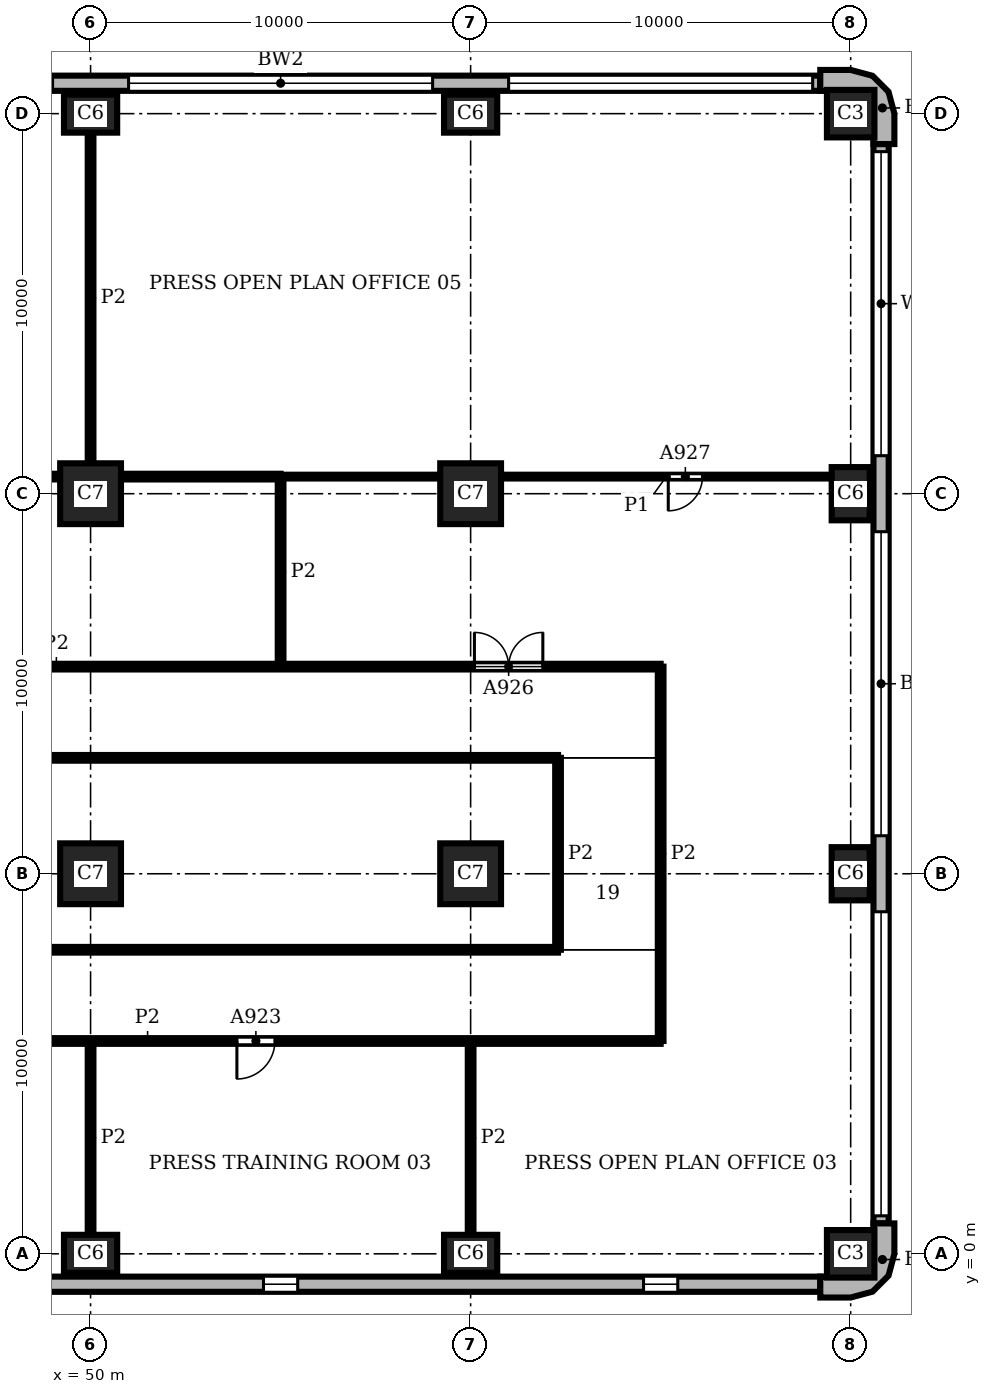
"""IFC4 building model, lengths in metres.
Left out: names, types, materials, properties, quantities, classifications, styles, units other than length and angle.
Written with IfcOpenShell. Run it as: python <this file> out.ifc"""

import sys

from ifc_helpers import new_model, si_unit, direction, frame, frame_2d, origin, origin_2d, place, context, subcontext, project, spatial, polyline, rectangle, outline, extrude, element, fill, save


model = new_model("IFC4")
c1 = context("Model", 3, precision=1e-05, world=origin(), true_north=direction((0.0, 1.0)))
c2 = subcontext(c1, "Body", "Model", "MODEL_VIEW")
j1 = project(units=[si_unit("LENGTHUNIT", "METRE"), si_unit("PLANEANGLEUNIT", "RADIAN")], contexts=[c1])
p1 = place(None, origin())
s1 = spatial("IfcSite", under=j1, at=p1, CompositionType="ELEMENT")
p2 = place(p1, origin())
s2 = spatial("IfcBuilding", under=s1, at=p2, CompositionType="ELEMENT")
p3 = place(p2, frame((0.0, 0.0, 113.4)))
s3 = spatial("IfcBuildingStorey", under=s2, at=p3, CompositionType="ELEMENT", Elevation=113.4)
for number, where, z_axis, x_axis in (
    (1, (50.0, 0.0, 0.0), (0.0, 0.0, 1.0), (1.0, 0.0, 0.0)),
    (2, (60.0, 0.0, 0.0), (0.0, 0.0, 1.0), (1.0, 0.0, 0.0)),
):
    element("IfcColumn", number, at=place(p3, frame(where, z_axis=z_axis, x_axis=x_axis)), inside=s3, PredefinedType="COLUMN", context=c2, shape_type="SweptSolid", body=[
        extrude(rectangle(XDim=1.4, YDim=1.0, at=origin_2d()), origin(), (0.0, 0.0, 1.0), 3.9),
    ])
p4 = place(p3, frame((70.0, 0.0, 0.0), z_axis=(0.0, 0.0, 1.0), x_axis=(1.0, 0.0, 0.0)))
e3 = element("IfcColumn", 3, at=p4, inside=s3, PredefinedType="COLUMN", context=c2, shape_type="SweptSolid", body=[
    extrude(rectangle(XDim=1.25, YDim=1.25, at=origin_2d()), origin(), (0.0, 0.0, 1.0), 3.9),
])
for number, where, z_axis, x_axis in (
    (4, (70.0, 10.0, 0.0), (0.0, 0.0, 1.0), (0.0, 1.0, 0.0)),
    (5, (70.0, 20.0, 0.0), (0.0, 0.0, 1.0), (0.0, 1.0, 0.0)),
):
    element("IfcColumn", number, at=place(p3, frame(where, z_axis=z_axis, x_axis=x_axis)), inside=s3, PredefinedType="COLUMN", context=c2, shape_type="SweptSolid", body=[
        extrude(rectangle(XDim=1.4, YDim=1.0, at=origin_2d()), origin(), (0.0, 0.0, 1.0), 3.9),
    ])
p5 = place(p3, frame((70.0, 30.0, 0.0), z_axis=(0.0, 0.0, 1.0), x_axis=(1.0, 0.0, 0.0)))
e6 = element("IfcColumn", 6, at=p5, inside=s3, PredefinedType="COLUMN", context=c2, shape_type="SweptSolid", body=[
    extrude(rectangle(XDim=1.25, YDim=1.25, at=origin_2d()), origin(), (0.0, 0.0, 1.0), 3.9),
])
for number, where, z_axis, x_axis in (
    (7, (60.0, 30.0, 0.0), (0.0, 0.0, 1.0), (1.0, 0.0, 0.0)),
    (8, (50.0, 30.0, 0.0), (0.0, 0.0, 1.0), (1.0, 0.0, 0.0)),
):
    element("IfcColumn", number, at=place(p3, frame(where, z_axis=z_axis, x_axis=x_axis)), inside=s3, PredefinedType="COLUMN", context=c2, shape_type="SweptSolid", body=[
        extrude(rectangle(XDim=1.4, YDim=1.0, at=origin_2d()), origin(), (0.0, 0.0, 1.0), 3.9),
    ])
for number, where, z_axis, x_axis in (
    (9, (50.0, 10.0, 0.0), (0.0, 0.0, 1.0), (1.0, 0.0, 0.0)),
    (10, (50.0, 20.0, 0.0), (0.0, 0.0, 1.0), (1.0, 0.0, 0.0)),
    (11, (60.0, 10.0, 0.0), (0.0, 0.0, 1.0), (1.0, 0.0, 0.0)),
    (12, (60.0, 20.0, 0.0), (0.0, 0.0, 1.0), (1.0, 0.0, 0.0)),
):
    element("IfcColumn", number, at=place(p3, frame(where, z_axis=z_axis, x_axis=x_axis)), inside=s3, PredefinedType="COLUMN", context=c2, shape_type="SweptSolid", body=[
        extrude(rectangle(XDim=1.6, YDim=1.6, at=origin_2d()), origin(), (0.0, 0.0, 1.0), 3.9),
    ])
p6 = place(p3, origin())
e13 = element("IfcWall", 13, at=p6, inside=s3, PredefinedType="SOLIDWALL", context=c2, shape_type="SweptSolid", body=[
    extrude(outline(polyline([(69.2, -1.0), (69.2, -1.15), (70.0, -1.15), (70.575, -0.996), (70.996, -0.575), (71.15, 0.0), (71.15, 0.8), (71.0, 0.8), (70.6, 0.8), (70.6, 0.0), (70.52, -0.3), (70.3, -0.52), (70.0, -0.6), (69.2, -0.6), (69.2, -1.0)])), origin(), (0.0, 0.0, 1.0), 3.9),
])
e14 = element("IfcWall", 14, at=p6, inside=s3, PredefinedType="SOLIDWALL", context=c2, shape_type="SweptSolid", body=[
    extrude(outline(polyline([(71.0, 29.2), (71.15, 29.2), (71.15, 30.0), (70.996, 30.575), (70.575, 30.996), (70.0, 31.15), (69.2, 31.15), (69.2, 31.0), (69.2, 30.6), (70.0, 30.6), (70.3, 30.52), (70.52, 30.3), (70.6, 30.0), (70.6, 29.2), (71.0, 29.2)])), origin(), (0.0, 0.0, 1.0), 3.9),
])
p7 = place(p3, frame((20.8, -0.8, 0.0), z_axis=(0.0, 0.0, 1.0), x_axis=(1.0, 0.0, 0.0)))
e15 = element("IfcWall", 15, at=p7, inside=s3, PredefinedType="SOLIDWALL", context=c2, shape_type="SweptSolid", body=[
    extrude(rectangle(XDim=48.4, YDim=0.4, at=frame_2d((24.2, 0.0))), origin(), (0.0, 0.0, 1.0), 3.9),
])
p8 = place(p7, frame((3.75, 0.0, 0.9)))
e16 = element("IfcOpeningElement", 16, at=p8, cuts=e15, PredefinedType="OPENING", context=c2, shape_type="SweptSolid", body=[
    extrude(rectangle(XDim=0.9, YDim=2.35, at=frame_2d((0.45, 1.175))), frame((0.0, 0.21, 0.0), z_axis=(0.0, -1.0, 0.0), x_axis=(1.0, 0.0, 0.0)), (0.0, 0.0, 1.0), 0.42),
])
p9 = place(p7, frame((13.75, 0.0, 0.9)))
e17 = element("IfcOpeningElement", 17, at=p9, cuts=e15, PredefinedType="OPENING", context=c2, shape_type="SweptSolid", body=[
    extrude(rectangle(XDim=0.9, YDim=2.35, at=frame_2d((0.45, 1.175))), frame((0.0, 0.21, 0.0), z_axis=(0.0, -1.0, 0.0), x_axis=(1.0, 0.0, 0.0)), (0.0, 0.0, 1.0), 0.42),
])
p10 = place(p7, frame((23.75, 0.0, 0.9)))
e18 = element("IfcOpeningElement", 18, at=p10, cuts=e15, PredefinedType="OPENING", context=c2, shape_type="SweptSolid", body=[
    extrude(rectangle(XDim=0.9, YDim=2.35, at=frame_2d((0.45, 1.175))), frame((0.0, 0.21, 0.0), z_axis=(0.0, -1.0, 0.0), x_axis=(1.0, 0.0, 0.0)), (0.0, 0.0, 1.0), 0.42),
])
p11 = place(p7, frame((33.75, 0.0, 0.9)))
e19 = element("IfcOpeningElement", 19, at=p11, cuts=e15, PredefinedType="OPENING", context=c2, shape_type="SweptSolid", body=[
    extrude(rectangle(XDim=0.9, YDim=2.35, at=frame_2d((0.45, 1.175))), frame((0.0, 0.21, 0.0), z_axis=(0.0, -1.0, 0.0), x_axis=(1.0, 0.0, 0.0)), (0.0, 0.0, 1.0), 0.42),
])
p12 = place(p7, frame((43.75, 0.0, 0.9)))
e20 = element("IfcOpeningElement", 20, at=p12, cuts=e15, PredefinedType="OPENING", context=c2, shape_type="SweptSolid", body=[
    extrude(rectangle(XDim=0.9, YDim=2.35, at=frame_2d((0.45, 1.175))), frame((0.0, 0.21, 0.0), z_axis=(0.0, -1.0, 0.0), x_axis=(1.0, 0.0, 0.0)), (0.0, 0.0, 1.0), 0.42),
])
p13 = place(p3, frame((70.8, 0.8, 0.0), z_axis=(0.0, 0.0, 1.0), x_axis=(0.0, 1.0, 0.0)))
e21 = element("IfcWall", 21, at=p13, inside=s3, PredefinedType="SOLIDWALL", context=c2, shape_type="SweptSolid", body=[
    extrude(rectangle(XDim=28.4, YDim=0.4, at=frame_2d((14.2, 0.0))), origin(), (0.0, 0.0, 1.0), 3.9),
])
p14 = place(p13, frame((0.2, 0.0, 0.9)))
e22 = element("IfcOpeningElement", 22, at=p14, cuts=e21, PredefinedType="OPENING", context=c2, shape_type="SweptSolid", body=[
    extrude(rectangle(XDim=8.0, YDim=2.35, at=frame_2d((4.0, 1.175))), frame((0.0, 0.21, 0.0), z_axis=(0.0, -1.0, 0.0), x_axis=(1.0, 0.0, 0.0)), (0.0, 0.0, 1.0), 0.42),
])
p15 = place(p13, frame((10.2, 0.0, 0.9)))
e23 = element("IfcOpeningElement", 23, at=p15, cuts=e21, PredefinedType="OPENING", context=c2, shape_type="SweptSolid", body=[
    extrude(rectangle(XDim=8.0, YDim=2.35, at=frame_2d((4.0, 1.175))), frame((0.0, 0.21, 0.0), z_axis=(0.0, -1.0, 0.0), x_axis=(1.0, 0.0, 0.0)), (0.0, 0.0, 1.0), 0.42),
])
p16 = place(p13, frame((20.2, 0.0, 0.9)))
e24 = element("IfcOpeningElement", 24, at=p16, cuts=e21, PredefinedType="OPENING", context=c2, shape_type="SweptSolid", body=[
    extrude(rectangle(XDim=8.0, YDim=2.35, at=frame_2d((4.0, 1.175))), frame((0.0, 0.21, 0.0), z_axis=(0.0, -1.0, 0.0), x_axis=(1.0, 0.0, 0.0)), (0.0, 0.0, 1.0), 0.42),
])
p17 = place(p3, frame((69.2, 30.8, 0.0), z_axis=(0.0, 0.0, 1.0), x_axis=(-1.0, 0.0, 0.0)))
e25 = element("IfcWall", 25, at=p17, inside=s3, PredefinedType="SOLIDWALL", context=c2, shape_type="SweptSolid", body=[
    extrude(rectangle(XDim=28.4, YDim=0.4, at=frame_2d((14.2, 0.0))), origin(), (0.0, 0.0, 1.0), 3.9),
])
p18 = place(p17, frame((0.2, 0.0, 0.9)))
e26 = element("IfcOpeningElement", 26, at=p18, cuts=e25, PredefinedType="OPENING", context=c2, shape_type="SweptSolid", body=[
    extrude(rectangle(XDim=8.0, YDim=2.35, at=frame_2d((4.0, 1.175))), frame((0.0, 0.21, 0.0), z_axis=(0.0, -1.0, 0.0), x_axis=(1.0, 0.0, 0.0)), (0.0, 0.0, 1.0), 0.42),
])
p19 = place(p17, frame((10.2, 0.0, 0.9)))
e27 = element("IfcOpeningElement", 27, at=p19, cuts=e25, PredefinedType="OPENING", context=c2, shape_type="SweptSolid", body=[
    extrude(rectangle(XDim=8.0, YDim=2.35, at=frame_2d((4.0, 1.175))), frame((0.0, 0.21, 0.0), z_axis=(0.0, -1.0, 0.0), x_axis=(1.0, 0.0, 0.0)), (0.0, 0.0, 1.0), 0.42),
])
p20 = place(p17, frame((20.2, 0.0, 0.9)))
e28 = element("IfcOpeningElement", 28, at=p20, cuts=e25, PredefinedType="OPENING", context=c2, shape_type="SweptSolid", body=[
    extrude(rectangle(XDim=8.0, YDim=2.35, at=frame_2d((4.0, 1.175))), frame((0.0, 0.21, 0.0), z_axis=(0.0, -1.0, 0.0), x_axis=(1.0, 0.0, 0.0)), (0.0, 0.0, 1.0), 0.42),
])
p21 = place(p3, frame((55.0, 20.45, 0.0), z_axis=(0.0, 0.0, 1.0), x_axis=(1.0, 0.0, 0.0)))
e29 = element("IfcWall", 29, at=p21, inside=s3, PredefinedType="PARTITIONING", context=c2, shape_type="SweptSolid", body=[
    extrude(rectangle(XDim=4.2, YDim=0.1, at=frame_2d((2.1, 0.0))), origin(), (0.0, 0.0, 1.0), 3.45),
])
p22 = place(p3, frame((60.8, 20.45, 0.0), z_axis=(0.0, 0.0, 1.0), x_axis=(1.0, 0.0, 0.0)))
e30 = element("IfcWall", 30, at=p22, inside=s3, PredefinedType="PARTITIONING", context=c2, shape_type="SweptSolid", body=[
    extrude(rectangle(XDim=8.7, YDim=0.1, at=frame_2d((4.35, 0.0))), origin(), (0.0, 0.0, 1.0), 3.45),
])
p23 = place(p22, frame((4.4, 0.0, 0.0)))
e31 = element("IfcOpeningElement", 31, at=p23, cuts=e30, PredefinedType="OPENING", context=c2, shape_type="SweptSolid", body=[
    extrude(rectangle(XDim=0.9, YDim=2.1, at=frame_2d((0.45, 1.05))), frame((0.0, 0.06, 0.0), z_axis=(0.0, -1.0, 0.0), x_axis=(1.0, 0.0, 0.0)), (0.0, 0.0, 1.0), 0.12),
])
p24 = place(p3, frame((50.0, 0.5, 0.0), z_axis=(0.0, 0.0, 1.0), x_axis=(0.0, 1.0, 0.0)))
e32 = element("IfcWall", 32, at=p24, inside=s3, PredefinedType="PARTITIONING", context=c2, shape_type="SweptSolid", body=[
    extrude(rectangle(XDim=5.1, YDim=0.15, at=frame_2d((2.55, 0.0))), origin(), (0.0, 0.0, 1.0), 3.45),
])
p25 = place(p3, frame((50.0, 20.8, 0.0), z_axis=(0.0, 0.0, 1.0), x_axis=(0.0, 1.0, 0.0)))
e33 = element("IfcWall", 33, at=p25, inside=s3, PredefinedType="PARTITIONING", context=c2, shape_type="SweptSolid", body=[
    extrude(rectangle(XDim=8.7, YDim=0.15, at=frame_2d((4.35, 0.0))), origin(), (0.0, 0.0, 1.0), 3.45),
])
p26 = place(p3, frame((55.0, 15.45, 0.0), z_axis=(0.0, 0.0, 1.0), x_axis=(0.0, 1.0, 0.0)))
e34 = element("IfcWall", 34, at=p26, inside=s3, PredefinedType="PARTITIONING", context=c2, shape_type="SweptSolid", body=[
    extrude(rectangle(XDim=5.0, YDim=0.15, at=frame_2d((2.5, 0.0))), origin(), (0.0, 0.0, 1.0), 3.45),
])
p27 = place(p3, frame((60.0, 0.5, 0.0), z_axis=(0.0, 0.0, 1.0), x_axis=(0.0, 1.0, 0.0)))
e35 = element("IfcWall", 35, at=p27, inside=s3, PredefinedType="PARTITIONING", context=c2, shape_type="SweptSolid", body=[
    extrude(rectangle(XDim=5.1, YDim=0.15, at=frame_2d((2.55, 0.0))), origin(), (0.0, 0.0, 1.0), 3.45),
])
p28 = place(p3, frame((62.3, 8.0, 0.0), z_axis=(0.0, 0.0, 1.0), x_axis=(0.0, 1.0, 0.0)))
e36 = element("IfcWall", 36, at=p28, inside=s3, PredefinedType="PARTITIONING", context=c2, shape_type="SweptSolid", body=[
    extrude(rectangle(XDim=5.05, YDim=0.15, at=frame_2d((2.525, 0.0))), origin(), (0.0, 0.0, 1.0), 3.45),
])
p29 = place(p3, frame((65.0, 5.6, 0.0), z_axis=(0.0, 0.0, 1.0), x_axis=(0.0, 1.0, 0.0)))
e37 = element("IfcWall", 37, at=p29, inside=s3, PredefinedType="PARTITIONING", context=c2, shape_type="SweptSolid", body=[
    extrude(rectangle(XDim=9.85, YDim=0.15, at=frame_2d((4.925, 0.0))), origin(), (0.0, 0.0, 1.0), 3.45),
])
p30 = place(p3, frame((38.0, 5.6, 0.0), z_axis=(0.0, 0.0, 1.0), x_axis=(1.0, 0.0, 0.0)))
e38 = element("IfcWall", 38, at=p30, inside=s3, PredefinedType="PARTITIONING", context=c2, shape_type="SweptSolid", body=[
    extrude(rectangle(XDim=27.0, YDim=0.15, at=frame_2d((13.5, 0.0))), origin(), (0.0, 0.0, 1.0), 3.45),
])
p31 = place(p30, frame((0.6, 0.0, 0.0)))
e39 = element("IfcOpeningElement", 39, at=p31, cuts=e38, PredefinedType="OPENING", context=c2, shape_type="SweptSolid", body=[
    extrude(rectangle(XDim=1.0, YDim=2.1, at=frame_2d((0.5, 1.05))), frame((0.0, 0.085, 0.0), z_axis=(0.0, -1.0, 0.0), x_axis=(1.0, 0.0, 0.0)), (0.0, 0.0, 1.0), 0.17),
])
p32 = place(p30, frame((6.1, 0.0, 0.0)))
e40 = element("IfcOpeningElement", 40, at=p32, cuts=e38, PredefinedType="OPENING", context=c2, shape_type="SweptSolid", body=[
    extrude(rectangle(XDim=1.0, YDim=2.1, at=frame_2d((0.5, 1.05))), frame((0.0, 0.085, 0.0), z_axis=(0.0, -1.0, 0.0), x_axis=(1.0, 0.0, 0.0)), (0.0, 0.0, 1.0), 0.17),
])
p33 = place(p30, frame((15.85, 0.0, 0.0)))
e41 = element("IfcOpeningElement", 41, at=p33, cuts=e38, PredefinedType="OPENING", context=c2, shape_type="SweptSolid", body=[
    extrude(rectangle(XDim=1.0, YDim=2.1, at=frame_2d((0.5, 1.05))), frame((0.0, 0.085, 0.0), z_axis=(0.0, -1.0, 0.0), x_axis=(1.0, 0.0, 0.0)), (0.0, 0.0, 1.0), 0.17),
])
p34 = place(p3, frame((33.2, 8.0, 0.0), z_axis=(0.0, 0.0, 1.0), x_axis=(1.0, 0.0, 0.0)))
e42 = element("IfcWall", 42, at=p34, inside=s3, PredefinedType="PARTITIONING", context=c2, shape_type="SweptSolid", body=[
    extrude(rectangle(XDim=29.1, YDim=0.15, at=frame_2d((14.55, 0.0))), origin(), (0.0, 0.0, 1.0), 3.45),
])
p35 = place(p3, frame((33.2, 13.05, 0.0), z_axis=(0.0, 0.0, 1.0), x_axis=(1.0, 0.0, 0.0)))
e43 = element("IfcWall", 43, at=p35, inside=s3, PredefinedType="PARTITIONING", context=c2, shape_type="SweptSolid", body=[
    extrude(rectangle(XDim=29.1, YDim=0.15, at=frame_2d((14.55, 0.0))), origin(), (0.0, 0.0, 1.0), 3.45),
])
p36 = place(p35, frame((14.1, 0.0, 0.0)))
e44 = element("IfcOpeningElement", 44, at=p36, cuts=e43, PredefinedType="OPENING", context=c2, shape_type="SweptSolid", body=[
    extrude(rectangle(XDim=1.0, YDim=2.1, at=frame_2d((0.5, 1.05))), frame((0.0, 0.085, 0.0), z_axis=(0.0, -1.0, 0.0), x_axis=(1.0, 0.0, 0.0)), (0.0, 0.0, 1.0), 0.17),
])
p37 = place(p3, frame((33.2, 15.45, 0.0), z_axis=(0.0, 0.0, 1.0), x_axis=(1.0, 0.0, 0.0)))
e45 = element("IfcWall", 45, at=p37, inside=s3, PredefinedType="PARTITIONING", context=c2, shape_type="SweptSolid", body=[
    extrude(rectangle(XDim=31.8, YDim=0.15, at=frame_2d((15.9, 0.0))), origin(), (0.0, 0.0, 1.0), 3.45),
])
p38 = place(p37, frame((11.85, 0.0, 0.0)))
e46 = element("IfcOpeningElement", 46, at=p38, cuts=e45, PredefinedType="OPENING", context=c2, shape_type="SweptSolid", body=[
    extrude(rectangle(XDim=1.0, YDim=2.1, at=frame_2d((0.5, 1.05))), frame((0.0, 0.085, 0.0), z_axis=(0.0, -1.0, 0.0), x_axis=(1.0, 0.0, 0.0)), (0.0, 0.0, 1.0), 0.17),
])
p39 = place(p37, frame((26.9, 0.0, 0.0)))
e47 = element("IfcOpeningElement", 47, at=p39, cuts=e45, PredefinedType="OPENING", context=c2, shape_type="SweptSolid", body=[
    extrude(rectangle(XDim=1.8, YDim=2.1, at=frame_2d((0.9, 1.05))), frame((0.0, 0.085, 0.0), z_axis=(0.0, -1.0, 0.0), x_axis=(1.0, 0.0, 0.0)), (0.0, 0.0, 1.0), 0.17),
])
p40 = place(p3, frame((40.8, 20.45, 0.0), z_axis=(0.0, 0.0, 1.0), x_axis=(1.0, 0.0, 0.0)))
e48 = element("IfcWall", 48, at=p40, inside=s3, PredefinedType="PARTITIONING", context=c2, shape_type="SweptSolid", body=[
    extrude(rectangle(XDim=8.4, YDim=0.15, at=frame_2d((4.2, 0.0))), origin(), (0.0, 0.0, 1.0), 3.45),
])
p41 = place(p3, frame((50.8, 20.45, 0.0), z_axis=(0.0, 0.0, 1.0), x_axis=(1.0, 0.0, 0.0)))
e49 = element("IfcWall", 49, at=p41, inside=s3, PredefinedType="PARTITIONING", context=c2, shape_type="SweptSolid", body=[
    extrude(rectangle(XDim=4.2, YDim=0.15, at=frame_2d((2.1, 0.0))), origin(), (0.0, 0.0, 1.0), 3.45),
])
p42 = place(p11, origin())
e50 = element("IfcWindow", 50, at=p42, inside=s3, PartitioningType="SINGLE_PANEL", PredefinedType="WINDOW", context=c2, shape_type="SweptSolid", body=[
    extrude(rectangle(XDim=0.9, YDim=2.35, at=frame_2d((0.45, 1.175))), frame((0.0, 0.16, 0.0), z_axis=(0.0, -1.0, 0.0), x_axis=(1.0, 0.0, 0.0)), (0.0, 0.0, 1.0), 0.06),
])
fill(e19, e50)
p43 = place(p12, origin())
e51 = element("IfcWindow", 51, at=p43, inside=s3, PartitioningType="SINGLE_PANEL", PredefinedType="WINDOW", context=c2, shape_type="SweptSolid", body=[
    extrude(rectangle(XDim=0.9, YDim=2.35, at=frame_2d((0.45, 1.175))), frame((0.0, 0.16, 0.0), z_axis=(0.0, -1.0, 0.0), x_axis=(1.0, 0.0, 0.0)), (0.0, 0.0, 1.0), 0.06),
])
fill(e20, e51)
p44 = place(p14, origin())
e52 = element("IfcWindow", 52, at=p44, inside=s3, PartitioningType="SINGLE_PANEL", PredefinedType="WINDOW", context=c2, shape_type="SweptSolid", body=[
    extrude(rectangle(XDim=8.0, YDim=2.35, at=frame_2d((4.0, 1.175))), frame((0.0, 0.16, 0.0), z_axis=(0.0, -1.0, 0.0), x_axis=(1.0, 0.0, 0.0)), (0.0, 0.0, 1.0), 0.06),
])
fill(e22, e52)
p45 = place(p15, origin())
e53 = element("IfcWindow", 53, at=p45, inside=s3, PartitioningType="SINGLE_PANEL", PredefinedType="WINDOW", context=c2, shape_type="SweptSolid", body=[
    extrude(rectangle(XDim=8.0, YDim=2.35, at=frame_2d((4.0, 1.175))), frame((0.0, 0.16, 0.0), z_axis=(0.0, -1.0, 0.0), x_axis=(1.0, 0.0, 0.0)), (0.0, 0.0, 1.0), 0.06),
])
fill(e23, e53)
p46 = place(p16, origin())
e54 = element("IfcWindow", 54, at=p46, inside=s3, PartitioningType="SINGLE_PANEL", PredefinedType="WINDOW", context=c2, shape_type="SweptSolid", body=[
    extrude(rectangle(XDim=8.0, YDim=2.35, at=frame_2d((4.0, 1.175))), frame((0.0, 0.16, 0.0), z_axis=(0.0, -1.0, 0.0), x_axis=(1.0, 0.0, 0.0)), (0.0, 0.0, 1.0), 0.06),
])
fill(e24, e54)
p47 = place(p18, origin())
e55 = element("IfcWindow", 55, at=p47, inside=s3, PartitioningType="SINGLE_PANEL", PredefinedType="WINDOW", context=c2, shape_type="SweptSolid", body=[
    extrude(rectangle(XDim=8.0, YDim=2.35, at=frame_2d((4.0, 1.175))), frame((0.0, 0.16, 0.0), z_axis=(0.0, -1.0, 0.0), x_axis=(1.0, 0.0, 0.0)), (0.0, 0.0, 1.0), 0.06),
])
fill(e26, e55)
p48 = place(p19, origin())
e56 = element("IfcWindow", 56, at=p48, inside=s3, PartitioningType="SINGLE_PANEL", PredefinedType="WINDOW", context=c2, shape_type="SweptSolid", body=[
    extrude(rectangle(XDim=8.0, YDim=2.35, at=frame_2d((4.0, 1.175))), frame((0.0, 0.16, 0.0), z_axis=(0.0, -1.0, 0.0), x_axis=(1.0, 0.0, 0.0)), (0.0, 0.0, 1.0), 0.06),
])
fill(e27, e56)
p49 = place(p33, frame((1.0, 0.0, 0.0), z_axis=(0.0, 0.0, 1.0), x_axis=(-1.0, 0.0, 0.0)))
e57 = element("IfcDoor", 57, at=p49, inside=s3, OperationType="SINGLE_SWING_RIGHT", PredefinedType="DOOR", context=c2, shape_type="SweptSolid", body=[
    extrude(rectangle(XDim=1.0, YDim=2.1, at=frame_2d((0.5, 1.05))), frame((0.0, 0.025, 0.0), z_axis=(0.0, -1.0, 0.0), x_axis=(1.0, 0.0, 0.0)), (0.0, 0.0, 1.0), 0.05),
])
fill(e41, e57)
p50 = place(p39, origin())
e58 = element("IfcDoor", 58, at=p50, inside=s3, OperationType="DOUBLE_DOOR_SINGLE_SWING", PredefinedType="DOOR", context=c2, shape_type="SweptSolid", body=[
    extrude(rectangle(XDim=1.8, YDim=2.1, at=frame_2d((0.9, 1.05))), frame((0.0, 0.025, 0.0), z_axis=(0.0, -1.0, 0.0), x_axis=(1.0, 0.0, 0.0)), (0.0, 0.0, 1.0), 0.05),
])
fill(e47, e58)
p51 = place(p23, frame((0.9, 0.0, 0.0), z_axis=(0.0, 0.0, 1.0), x_axis=(-1.0, 0.0, 0.0)))
e59 = element("IfcDoor", 59, at=p51, inside=s3, OperationType="SINGLE_SWING_RIGHT", PredefinedType="DOOR", context=c2, shape_type="SweptSolid", body=[
    extrude(rectangle(XDim=0.9, YDim=2.1, at=frame_2d((0.45, 1.05))), frame((0.0, 0.025, 0.0), z_axis=(0.0, -1.0, 0.0), x_axis=(1.0, 0.0, 0.0)), (0.0, 0.0, 1.0), 0.05),
])
fill(e31, e59)
save(model, sys.argv[1])
